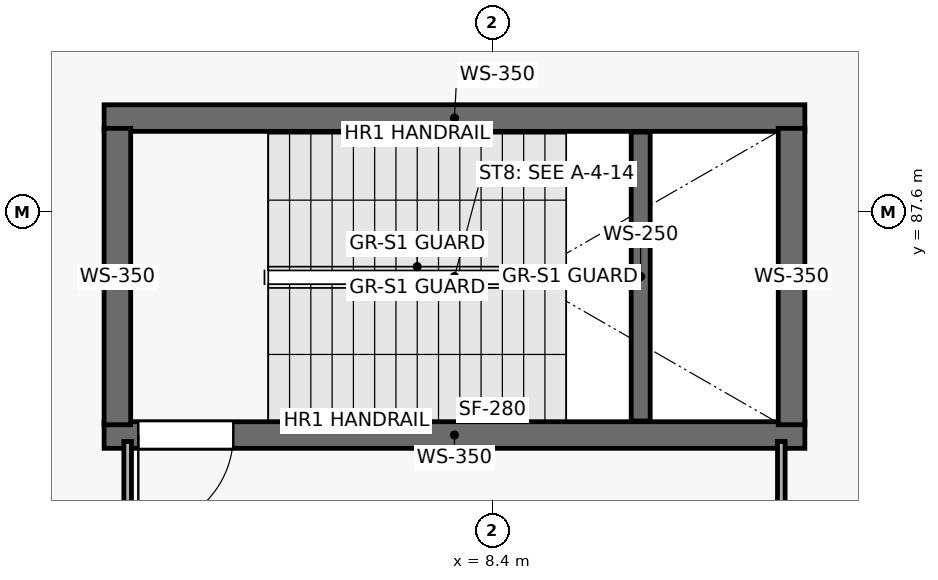
"""IFC4 building model, lengths in metres.
Left out: names, types, materials, properties, quantities, classifications, styles, units other than length and angle.
Written with IfcOpenShell. Run it as: python <this file> out.ifc"""

import sys

from ifc_helpers import new_model, si_unit, direction, frame, frame_2d, origin, place, context, subcontext, project, spatial, rectangle, extrude, element, fill, save


model = new_model("IFC4")
c1 = context("Model", 3, precision=1e-05, world=origin(), true_north=direction((0.0, 1.0)))
c2 = subcontext(c1, "Body", "Model", "MODEL_VIEW")
j1 = project(units=[si_unit("LENGTHUNIT", "METRE"), si_unit("PLANEANGLEUNIT", "RADIAN")], contexts=[c1])
p1 = place(None, origin())
s1 = spatial("IfcSite", under=j1, at=p1, CompositionType="ELEMENT")
p2 = place(p1, origin())
s2 = spatial("IfcBuilding", under=s1, at=p2, CompositionType="ELEMENT")
p3 = place(p2, origin())
s3 = spatial("IfcBuildingStorey", under=s2, at=p3, CompositionType="ELEMENT", Elevation=0.0)
p4 = place(p3, frame((3.29, 84.665, 0.0), z_axis=(0.0, 0.0, 1.0), x_axis=(1.0, 0.0, 0.0)))
e1 = element("IfcWall", 1, at=p4, inside=s3, PredefinedType="SHEAR", context=c2, shape_type="SweptSolid", body=[
    extrude(rectangle(XDim=9.22, YDim=0.35, at=frame_2d((4.61, 0.0))), origin(), (0.0, 0.0, 1.0), 5.12),
])
p5 = place(p4, frame((0.45, 0.0, 0.0)))
e2 = element("IfcOpeningElement", 2, at=p5, cuts=e1, PredefinedType="OPENING", context=c2, shape_type="SweptSolid", body=[
    extrude(rectangle(XDim=1.25, YDim=2.2, at=frame_2d((0.625, 1.1))), frame((0.0, 0.185, 0.0), z_axis=(0.0, -1.0, 0.0), x_axis=(1.0, 0.0, 0.0)), (0.0, 0.0, 1.0), 0.37),
])
p6 = place(p3, frame((12.51, 88.835, 0.0), z_axis=(0.0, 0.0, 1.0), x_axis=(-1.0, 0.0, 0.0)))
e3 = element("IfcWall", 3, at=p6, inside=s3, PredefinedType="SHEAR", context=c2, shape_type="SweptSolid", body=[
    extrude(rectangle(XDim=9.22, YDim=0.35, at=frame_2d((4.61, 0.0))), origin(), (0.0, 0.0, 1.0), 5.12),
])
for number, where, z_axis, x_axis in (
    (4, (3.465, 84.8, 0.0), (0.0, 0.0, 1.0), (0.0, 1.0, 0.0)),
    (5, (12.335, 88.7, 0.0), (0.0, 0.0, 1.0), (0.0, -1.0, 0.0)),
):
    element("IfcWall", number, at=place(p3, frame(where, z_axis=z_axis, x_axis=x_axis)), inside=s3, PredefinedType="SHEAR", context=c2, shape_type="SweptSolid", body=[
        extrude(rectangle(XDim=3.9, YDim=0.35, at=frame_2d((1.95, 0.0))), origin(), (0.0, 0.0, 1.0), 5.12),
    ])
p7 = place(p3, frame((10.35, 84.85, 0.0), z_axis=(0.0, 0.0, 1.0), x_axis=(0.0, 1.0, 0.0)))
e6 = element("IfcWall", 6, at=p7, inside=s3, PredefinedType="SHEAR", context=c2, shape_type="SweptSolid", body=[
    extrude(rectangle(XDim=3.8, YDim=0.25, at=frame_2d((1.9, 0.0))), origin(), (0.0, 0.0, 1.0), 2.52),
])
p8 = place(p3, frame((12.2, 81.8, 0.0), z_axis=(0.0, 0.0, 1.0), x_axis=(0.0, 1.0, 0.0)))
e7 = element("IfcWall", 7, at=p8, inside=s3, PredefinedType="PARTITIONING", context=c2, shape_type="SweptSolid", body=[
    extrude(rectangle(XDim=2.78, YDim=0.1, at=frame_2d((1.39, 0.0))), origin(), (0.0, 0.0, 1.0), 5.12),
])
p9 = place(p3, frame((3.6, 84.58, 0.0), z_axis=(0.0, 0.0, 1.0), x_axis=(0.0, -1.0, 0.0)))
e8 = element("IfcWall", 8, at=p9, inside=s3, PredefinedType="PARTITIONING", context=c2, shape_type="SweptSolid", body=[
    extrude(rectangle(XDim=2.65, YDim=0.1, at=frame_2d((1.325, 0.0))), origin(), (0.0, 0.0, 1.0), 5.12),
])
p10 = place(p5, origin())
e9 = element("IfcDoor", 9, at=p10, inside=s3, OperationType="SINGLE_SWING_RIGHT", PredefinedType="DOOR", context=c2, shape_type="SweptSolid", body=[
    extrude(rectangle(XDim=1.25, YDim=2.2, at=frame_2d((0.625, 1.1))), frame((0.0, 0.025, 0.0), z_axis=(0.0, -1.0, 0.0), x_axis=(1.0, 0.0, 0.0)), (0.0, 0.0, 1.0), 0.05),
])
fill(e2, e9)
save(model, sys.argv[1])
